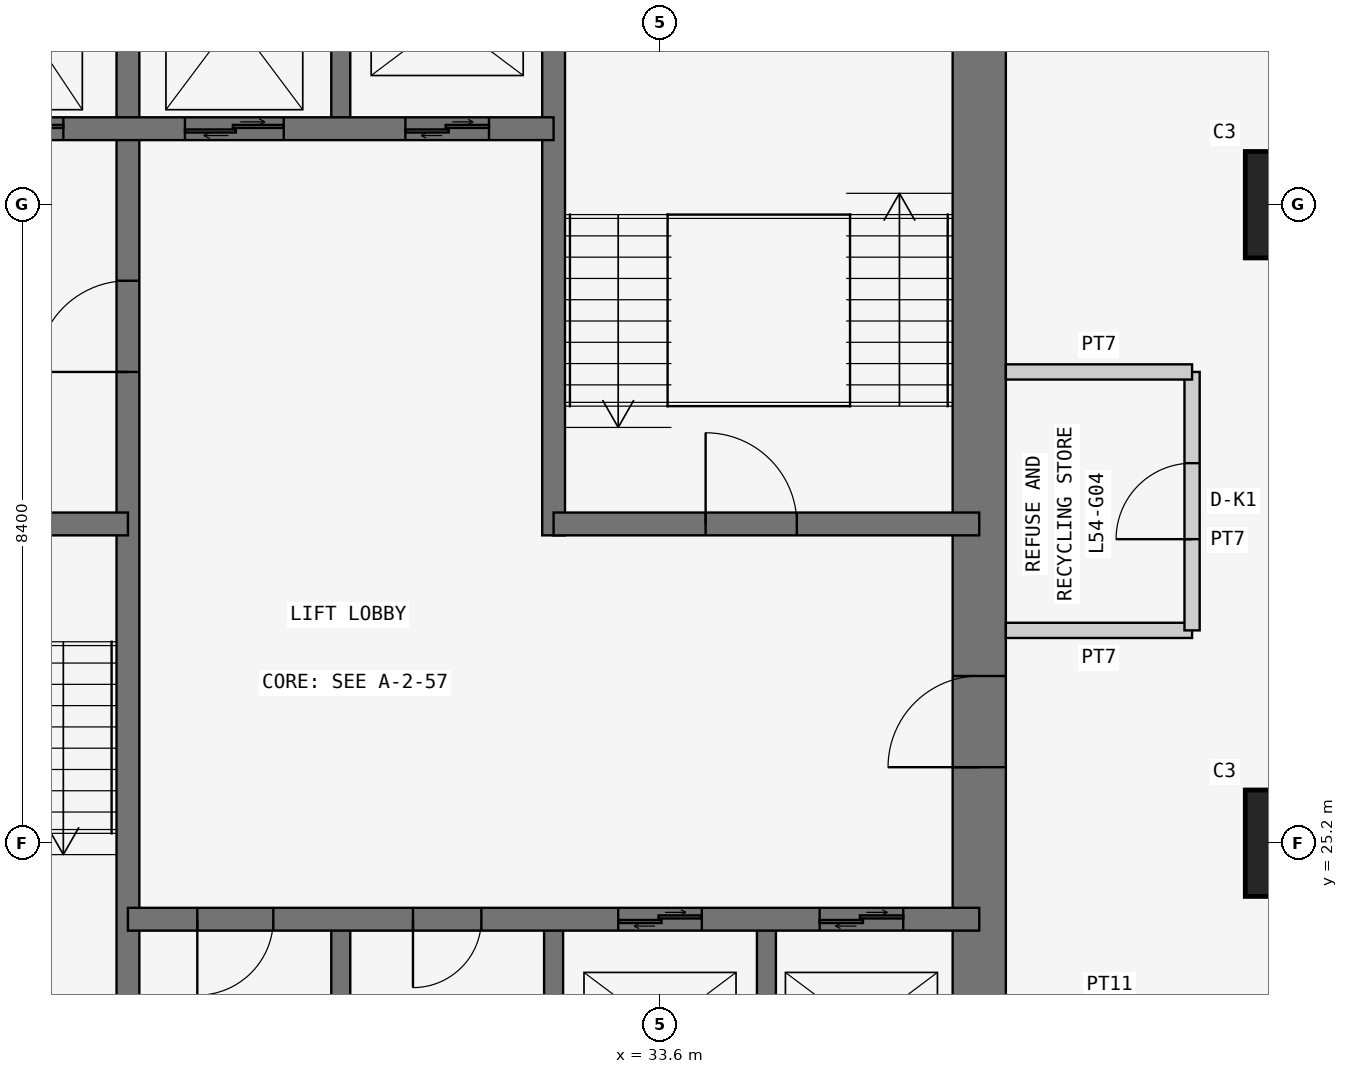
"""IFC4 building model, lengths in metres.
Left out: names, types, materials, properties, quantities, classifications, styles, units other than length and angle.
Written with IfcOpenShell. Run it as: python <this file> out.ifc"""

import sys

from ifc_helpers import new_model, si_unit, direction, frame, frame_2d, origin, origin_2d, place, context, subcontext, project, spatial, rectangle, extrude, element, fill, save


model = new_model("IFC4")
c1 = context("Model", 3, precision=1e-05, world=origin(), true_north=direction((0.0, 1.0)))
c2 = subcontext(c1, "Body", "Model", "MODEL_VIEW")
j1 = project(units=[si_unit("LENGTHUNIT", "METRE"), si_unit("PLANEANGLEUNIT", "RADIAN")], contexts=[c1])
p1 = place(None, origin())
s1 = spatial("IfcSite", under=j1, at=p1, CompositionType="ELEMENT")
p2 = place(p1, origin())
s2 = spatial("IfcBuilding", under=s1, at=p2, CompositionType="ELEMENT")
p3 = place(p2, frame((0.0, 0.0, 208.5)))
s3 = spatial("IfcBuildingStorey", under=s2, at=p3, CompositionType="ELEMENT", Elevation=208.5)
for number, where, z_axis, x_axis in (
    (1, (42.0, 25.2, 0.0), (0.0, 0.0, 1.0), (1.0, 0.0, 0.0)),
    (2, (42.0, 33.6, 0.0), (0.0, 0.0, 1.0), (1.0, 0.0, 0.0)),
):
    element("IfcColumn", number, at=place(p3, frame(where, z_axis=z_axis, x_axis=x_axis)), inside=s3, PredefinedType="COLUMN", context=c2, shape_type="SweptSolid", body=[
        extrude(rectangle(XDim=1.4, YDim=1.4, at=origin_2d()), origin(), (0.0, 0.0, 1.0), 3.6),
    ])
p4 = place(p3, frame((37.8, 21.0, 0.0), z_axis=(0.0, 0.0, 1.0), x_axis=(0.0, 1.0, 0.0)))
e3 = element("IfcWall", 3, at=p4, inside=s3, PredefinedType="SHEAR", context=c2, shape_type="SweptSolid", body=[
    extrude(rectangle(XDim=17.15, YDim=0.7, at=frame_2d((8.575, 0.0))), origin(), (0.0, 0.0, 1.0), 3.6),
])
p5 = place(p4, frame((5.2, 0.0, 0.0)))
e4 = element("IfcOpeningElement", 4, at=p5, cuts=e3, PredefinedType="OPENING", context=c2, shape_type="SweptSolid", body=[
    extrude(rectangle(XDim=1.2, YDim=2.1, at=frame_2d((0.6, 1.05))), frame((0.0, 0.36, 0.0), z_axis=(0.0, -1.0, 0.0), x_axis=(1.0, 0.0, 0.0)), (0.0, 0.0, 1.0), 0.72),
])
p6 = place(p3, frame((26.6, 21.0, 0.0), z_axis=(0.0, 0.0, 1.0), x_axis=(0.0, 1.0, 0.0)))
e5 = element("IfcWall", 5, at=p6, inside=s3, PredefinedType="SHEAR", context=c2, shape_type="SweptSolid", body=[
    extrude(rectangle(XDim=16.8, YDim=0.3, at=frame_2d((8.4, 0.0))), origin(), (0.0, 0.0, 1.0), 3.6),
])
p7 = place(p6, frame((10.4, 0.0, 0.0)))
e6 = element("IfcOpeningElement", 6, at=p7, cuts=e5, PredefinedType="OPENING", context=c2, shape_type="SweptSolid", body=[
    extrude(rectangle(XDim=1.2, YDim=2.1, at=frame_2d((0.6, 1.05))), frame((0.0, 0.16, 0.0), z_axis=(0.0, -1.0, 0.0), x_axis=(1.0, 0.0, 0.0)), (0.0, 0.0, 1.0), 0.32),
])
p8 = place(p3, frame((21.0, 29.4, 0.0), z_axis=(0.0, 0.0, 1.0), x_axis=(1.0, 0.0, 0.0)))
e7 = element("IfcWall", 7, at=p8, inside=s3, PredefinedType="SHEAR", context=c2, shape_type="SweptSolid", body=[
    extrude(rectangle(XDim=5.6, YDim=0.3, at=frame_2d((2.8, 0.0))), origin(), (0.0, 0.0, 1.0), 3.6),
])
p9 = place(p8, frame((2.3, 0.0, 0.0)))
e8 = element("IfcOpeningElement", 8, at=p9, cuts=e7, PredefinedType="OPENING", context=c2, shape_type="SweptSolid", body=[
    extrude(rectangle(XDim=1.2, YDim=2.1, at=frame_2d((0.6, 1.05))), frame((0.0, 0.16, 0.0), z_axis=(0.0, -1.0, 0.0), x_axis=(1.0, 0.0, 0.0)), (0.0, 0.0, 1.0), 0.32),
])
p10 = place(p3, frame((21.0, 34.6, 0.0), z_axis=(0.0, 0.0, 1.0), x_axis=(1.0, 0.0, 0.0)))
e9 = element("IfcWall", 9, at=p10, inside=s3, PredefinedType="SHEAR", context=c2, shape_type="SweptSolid", body=[
    extrude(rectangle(XDim=11.2, YDim=0.3, at=frame_2d((5.6, 0.0))), origin(), (0.0, 0.0, 1.0), 3.6),
])
p11 = place(p10, frame((9.25, 0.0, 0.0)))
e10 = element("IfcOpeningElement", 10, at=p11, cuts=e9, PredefinedType="OPENING", context=c2, shape_type="SweptSolid", body=[
    extrude(rectangle(XDim=1.1, YDim=2.1, at=frame_2d((0.55, 1.05))), frame((0.0, 0.16, 0.0), z_axis=(0.0, -1.0, 0.0), x_axis=(1.0, 0.0, 0.0)), (0.0, 0.0, 1.0), 0.32),
])
p12 = place(p10, frame((1.0, 0.0, 0.0)))
e11 = element("IfcOpeningElement", 11, at=p12, cuts=e9, PredefinedType="OPENING", context=c2, shape_type="SweptSolid", body=[
    extrude(rectangle(XDim=1.1, YDim=2.1, at=frame_2d((0.55, 1.05))), frame((0.0, 0.16, 0.0), z_axis=(0.0, -1.0, 0.0), x_axis=(1.0, 0.0, 0.0)), (0.0, 0.0, 1.0), 0.32),
])
p13 = place(p10, frame((3.65, 0.0, 0.0)))
e12 = element("IfcOpeningElement", 12, at=p13, cuts=e9, PredefinedType="OPENING", context=c2, shape_type="SweptSolid", body=[
    extrude(rectangle(XDim=1.1, YDim=2.1, at=frame_2d((0.55, 1.05))), frame((0.0, 0.16, 0.0), z_axis=(0.0, -1.0, 0.0), x_axis=(1.0, 0.0, 0.0)), (0.0, 0.0, 1.0), 0.32),
])
p14 = place(p10, frame((6.35, 0.0, 0.0)))
e13 = element("IfcOpeningElement", 13, at=p14, cuts=e9, PredefinedType="OPENING", context=c2, shape_type="SweptSolid", body=[
    extrude(rectangle(XDim=1.3, YDim=2.1, at=frame_2d((0.65, 1.05))), frame((0.0, 0.16, 0.0), z_axis=(0.0, -1.0, 0.0), x_axis=(1.0, 0.0, 0.0)), (0.0, 0.0, 1.0), 0.32),
])
p15 = place(p3, frame((26.6, 24.2, 0.0), z_axis=(0.0, 0.0, 1.0), x_axis=(1.0, 0.0, 0.0)))
e14 = element("IfcWall", 14, at=p15, inside=s3, PredefinedType="SHEAR", context=c2, shape_type="SweptSolid", body=[
    extrude(rectangle(XDim=11.2, YDim=0.3, at=frame_2d((5.6, 0.0))), origin(), (0.0, 0.0, 1.0), 3.6),
])
p16 = place(p15, frame((0.913, 0.0, 0.0)))
e15 = element("IfcOpeningElement", 15, at=p16, cuts=e14, PredefinedType="OPENING", context=c2, shape_type="SweptSolid", body=[
    extrude(rectangle(XDim=1.0, YDim=2.1, at=frame_2d((0.5, 1.05))), frame((0.0, 0.16, 0.0), z_axis=(0.0, -1.0, 0.0), x_axis=(1.0, 0.0, 0.0)), (0.0, 0.0, 1.0), 0.32),
])
p17 = place(p15, frame((3.75, 0.0, 0.0)))
e16 = element("IfcOpeningElement", 16, at=p17, cuts=e14, PredefinedType="OPENING", context=c2, shape_type="SweptSolid", body=[
    extrude(rectangle(XDim=0.9, YDim=2.1, at=frame_2d((0.45, 1.05))), frame((0.0, 0.16, 0.0), z_axis=(0.0, -1.0, 0.0), x_axis=(1.0, 0.0, 0.0)), (0.0, 0.0, 1.0), 0.32),
])
p18 = place(p15, frame((6.45, 0.0, 0.0)))
e17 = element("IfcOpeningElement", 17, at=p18, cuts=e14, PredefinedType="OPENING", context=c2, shape_type="SweptSolid", body=[
    extrude(rectangle(XDim=1.1, YDim=2.1, at=frame_2d((0.55, 1.05))), frame((0.0, 0.16, 0.0), z_axis=(0.0, -1.0, 0.0), x_axis=(1.0, 0.0, 0.0)), (0.0, 0.0, 1.0), 0.32),
])
p19 = place(p15, frame((9.1, 0.0, 0.0)))
e18 = element("IfcOpeningElement", 18, at=p19, cuts=e14, PredefinedType="OPENING", context=c2, shape_type="SweptSolid", body=[
    extrude(rectangle(XDim=1.1, YDim=2.1, at=frame_2d((0.55, 1.05))), frame((0.0, 0.16, 0.0), z_axis=(0.0, -1.0, 0.0), x_axis=(1.0, 0.0, 0.0)), (0.0, 0.0, 1.0), 0.32),
])
p20 = place(p3, frame((32.2, 29.25, 0.0), z_axis=(0.0, 0.0, 1.0), x_axis=(0.0, 1.0, 0.0)))
e19 = element("IfcWall", 19, at=p20, inside=s3, PredefinedType="SHEAR", context=c2, shape_type="SweptSolid", body=[
    extrude(rectangle(XDim=8.55, YDim=0.3, at=frame_2d((4.275, 0.0))), origin(), (0.0, 0.0, 1.0), 3.6),
])
p21 = place(p3, frame((32.2, 29.4, 0.0), z_axis=(0.0, 0.0, 1.0), x_axis=(1.0, 0.0, 0.0)))
e20 = element("IfcWall", 20, at=p21, inside=s3, PredefinedType="SHEAR", context=c2, shape_type="SweptSolid", body=[
    extrude(rectangle(XDim=5.6, YDim=0.3, at=frame_2d((2.8, 0.0))), origin(), (0.0, 0.0, 1.0), 3.6),
])
p22 = place(p21, frame((2.0, 0.0, 0.0)))
e21 = element("IfcOpeningElement", 21, at=p22, cuts=e20, PredefinedType="OPENING", context=c2, shape_type="SweptSolid", body=[
    extrude(rectangle(XDim=1.2, YDim=2.1, at=frame_2d((0.6, 1.05))), frame((0.0, 0.16, 0.0), z_axis=(0.0, -1.0, 0.0), x_axis=(1.0, 0.0, 0.0)), (0.0, 0.0, 1.0), 0.32),
])
for number, where, z_axis, x_axis in (
    (22, (29.4, 21.0, 0.0), (0.0, 0.0, 1.0), (0.0, 1.0, 0.0)),
    (23, (32.2, 21.0, 0.0), (0.0, 0.0, 1.0), (0.0, 1.0, 0.0)),
    (24, (35.0, 21.0, 0.0), (0.0, 0.0, 1.0), (0.0, 1.0, 0.0)),
    (25, (29.4, 34.6, 0.0), (0.0, 0.0, 1.0), (0.0, 1.0, 0.0)),
):
    element("IfcWall", number, at=place(p3, frame(where, z_axis=z_axis, x_axis=x_axis)), inside=s3, PredefinedType="SHEAR", context=c2, shape_type="SweptSolid", body=[
        extrude(rectangle(XDim=3.2, YDim=0.25, at=frame_2d((1.6, 0.0))), origin(), (0.0, 0.0, 1.0), 3.6),
    ])
p23 = place(p3, frame((38.15, 28.0, 0.0), z_axis=(0.0, 0.0, 1.0), x_axis=(1.0, 0.0, 0.0)))
e26 = element("IfcWall", 26, at=p23, inside=s3, PredefinedType="PARTITIONING", context=c2, shape_type="SweptSolid", body=[
    extrude(rectangle(XDim=2.45, YDim=0.2, at=frame_2d((1.225, 0.0))), origin(), (0.0, 0.0, 1.0), 3.45),
])
p24 = place(p3, frame((40.6, 28.0, 0.0), z_axis=(0.0, 0.0, 1.0), x_axis=(0.0, 1.0, 0.0)))
e27 = element("IfcWall", 27, at=p24, inside=s3, PredefinedType="PARTITIONING", context=c2, shape_type="SweptSolid", body=[
    extrude(rectangle(XDim=3.4, YDim=0.2, at=frame_2d((1.7, 0.0))), origin(), (0.0, 0.0, 1.0), 3.45),
])
p25 = place(p24, frame((1.2, 0.0, 0.0)))
e28 = element("IfcOpeningElement", 28, at=p25, cuts=e27, PredefinedType="OPENING", context=c2, shape_type="SweptSolid", body=[
    extrude(rectangle(XDim=1.0, YDim=2.1, at=frame_2d((0.5, 1.05))), frame((0.0, 0.11, 0.0), z_axis=(0.0, -1.0, 0.0), x_axis=(1.0, 0.0, 0.0)), (0.0, 0.0, 1.0), 0.22),
])
p26 = place(p3, frame((40.6, 31.4, 0.0), z_axis=(0.0, 0.0, 1.0), x_axis=(-1.0, 0.0, 0.0)))
e29 = element("IfcWall", 29, at=p26, inside=s3, PredefinedType="PARTITIONING", context=c2, shape_type="SweptSolid", body=[
    extrude(rectangle(XDim=2.45, YDim=0.2, at=frame_2d((1.225, 0.0))), origin(), (0.0, 0.0, 1.0), 3.45),
])
p27 = place(p25, origin())
e30 = element("IfcDoor", 30, at=p27, inside=s3, OperationType="SINGLE_SWING_LEFT", PredefinedType="DOOR", context=c2, shape_type="SweptSolid", body=[
    extrude(rectangle(XDim=1.0, YDim=2.1, at=frame_2d((0.5, 1.05))), frame((0.0, 0.025, 0.0), z_axis=(0.0, -1.0, 0.0), x_axis=(1.0, 0.0, 0.0)), (0.0, 0.0, 1.0), 0.05),
])
fill(e28, e30)
p28 = place(p7, origin())
e31 = element("IfcDoor", 31, at=p28, inside=s3, OperationType="SINGLE_SWING_LEFT", PredefinedType="DOOR", context=c2, shape_type="SweptSolid", body=[
    extrude(rectangle(XDim=1.2, YDim=2.1, at=frame_2d((0.6, 1.05))), frame((0.0, 0.025, 0.0), z_axis=(0.0, -1.0, 0.0), x_axis=(1.0, 0.0, 0.0)), (0.0, 0.0, 1.0), 0.05),
])
fill(e6, e31)
p29 = place(p5, origin())
e32 = element("IfcDoor", 32, at=p29, inside=s3, OperationType="SINGLE_SWING_LEFT", PredefinedType="DOOR", context=c2, shape_type="SweptSolid", body=[
    extrude(rectangle(XDim=1.2, YDim=2.1, at=frame_2d((0.6, 1.05))), frame((0.0, 0.025, 0.0), z_axis=(0.0, -1.0, 0.0), x_axis=(1.0, 0.0, 0.0)), (0.0, 0.0, 1.0), 0.05),
])
fill(e4, e32)
p30 = place(p22, origin())
e33 = element("IfcDoor", 33, at=p30, inside=s3, OperationType="SINGLE_SWING_LEFT", PredefinedType="DOOR", context=c2, shape_type="SweptSolid", body=[
    extrude(rectangle(XDim=1.2, YDim=2.1, at=frame_2d((0.6, 1.05))), frame((0.0, 0.025, 0.0), z_axis=(0.0, -1.0, 0.0), x_axis=(1.0, 0.0, 0.0)), (0.0, 0.0, 1.0), 0.05),
])
fill(e21, e33)
p31 = place(p16, frame((1.0, 0.0, 0.0), z_axis=(0.0, 0.0, 1.0), x_axis=(-1.0, 0.0, 0.0)))
e34 = element("IfcDoor", 34, at=p31, inside=s3, OperationType="SINGLE_SWING_RIGHT", PredefinedType="DOOR", context=c2, shape_type="SweptSolid", body=[
    extrude(rectangle(XDim=1.0, YDim=2.1, at=frame_2d((0.5, 1.05))), frame((0.0, 0.025, 0.0), z_axis=(0.0, -1.0, 0.0), x_axis=(1.0, 0.0, 0.0)), (0.0, 0.0, 1.0), 0.05),
])
fill(e15, e34)
p32 = place(p17, frame((0.9, 0.0, 0.0), z_axis=(0.0, 0.0, 1.0), x_axis=(-1.0, 0.0, 0.0)))
e35 = element("IfcDoor", 35, at=p32, inside=s3, OperationType="SINGLE_SWING_RIGHT", PredefinedType="DOOR", context=c2, shape_type="SweptSolid", body=[
    extrude(rectangle(XDim=0.9, YDim=2.1, at=frame_2d((0.45, 1.05))), frame((0.0, 0.025, 0.0), z_axis=(0.0, -1.0, 0.0), x_axis=(1.0, 0.0, 0.0)), (0.0, 0.0, 1.0), 0.05),
])
fill(e16, e35)
p33 = place(p18, origin())
e36 = element("IfcDoor", 36, at=p33, inside=s3, OperationType="DOUBLE_DOOR_SLIDING", PredefinedType="DOOR", context=c2, shape_type="SweptSolid", body=[
    extrude(rectangle(XDim=1.1, YDim=2.1, at=frame_2d((0.55, 1.05))), frame((0.0, 0.025, 0.0), z_axis=(0.0, -1.0, 0.0), x_axis=(1.0, 0.0, 0.0)), (0.0, 0.0, 1.0), 0.05),
])
fill(e17, e36)
p34 = place(p19, origin())
e37 = element("IfcDoor", 37, at=p34, inside=s3, OperationType="DOUBLE_DOOR_SLIDING", PredefinedType="DOOR", context=c2, shape_type="SweptSolid", body=[
    extrude(rectangle(XDim=1.1, YDim=2.1, at=frame_2d((0.55, 1.05))), frame((0.0, 0.025, 0.0), z_axis=(0.0, -1.0, 0.0), x_axis=(1.0, 0.0, 0.0)), (0.0, 0.0, 1.0), 0.05),
])
fill(e18, e37)
p35 = place(p11, origin())
e38 = element("IfcDoor", 38, at=p35, inside=s3, OperationType="DOUBLE_DOOR_SLIDING", PredefinedType="DOOR", context=c2, shape_type="SweptSolid", body=[
    extrude(rectangle(XDim=1.1, YDim=2.1, at=frame_2d((0.55, 1.05))), frame((0.0, 0.025, 0.0), z_axis=(0.0, -1.0, 0.0), x_axis=(1.0, 0.0, 0.0)), (0.0, 0.0, 1.0), 0.05),
])
fill(e10, e38)
p36 = place(p13, origin())
e39 = element("IfcDoor", 39, at=p36, inside=s3, OperationType="DOUBLE_DOOR_SLIDING", PredefinedType="DOOR", context=c2, shape_type="SweptSolid", body=[
    extrude(rectangle(XDim=1.1, YDim=2.1, at=frame_2d((0.55, 1.05))), frame((0.0, 0.025, 0.0), z_axis=(0.0, -1.0, 0.0), x_axis=(1.0, 0.0, 0.0)), (0.0, 0.0, 1.0), 0.05),
])
fill(e12, e39)
p37 = place(p14, origin())
e40 = element("IfcDoor", 40, at=p37, inside=s3, OperationType="DOUBLE_DOOR_SLIDING", PredefinedType="DOOR", context=c2, shape_type="SweptSolid", body=[
    extrude(rectangle(XDim=1.3, YDim=2.1, at=frame_2d((0.65, 1.05))), frame((0.0, 0.025, 0.0), z_axis=(0.0, -1.0, 0.0), x_axis=(1.0, 0.0, 0.0)), (0.0, 0.0, 1.0), 0.05),
])
fill(e13, e40)
save(model, sys.argv[1])
